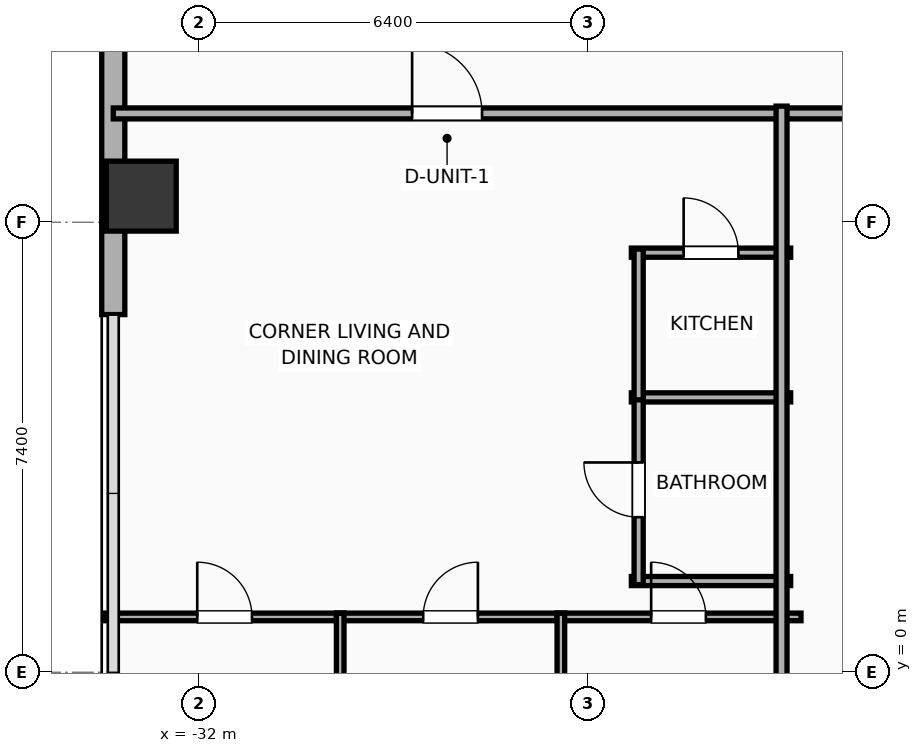
"""IFC4 building model, lengths in metres.
Left out: names, types, materials, properties, quantities, classifications, styles, units other than length and angle.
Written with IfcOpenShell. Run it as: python <this file> out.ifc"""

import sys

from ifc_helpers import new_model, si_unit, direction, frame, frame_2d, origin, origin_2d, place, context, subcontext, project, spatial, rectangle, hollow_rectangle, extrude, element, fill, save


model = new_model("IFC4")
c1 = context("Model", 3, precision=1e-05, world=origin(), true_north=direction((0.0, 1.0)))
c2 = subcontext(c1, "Body", "Model", "MODEL_VIEW")
j1 = project(units=[si_unit("LENGTHUNIT", "METRE"), si_unit("PLANEANGLEUNIT", "RADIAN")], contexts=[c1])
p1 = place(None, origin())
s1 = spatial("IfcSite", under=j1, at=p1, CompositionType="ELEMENT")
p2 = place(p1, origin())
s2 = spatial("IfcBuilding", under=s1, at=p2, CompositionType="ELEMENT")
p3 = place(p2, frame((0.0, 0.0, 61.1)))
s3 = spatial("IfcBuildingStorey", under=s2, at=p3, CompositionType="ELEMENT", Elevation=61.1)
p4 = place(p3, frame((-32.95, 7.83, 0.0), z_axis=(0.0, 0.0, 1.0), x_axis=(1.0, 0.0, 0.0)))
e1 = element("IfcColumn", 1, at=p4, inside=s3, PredefinedType="COLUMN", context=c2, shape_type="SweptSolid", body=[
    extrude(hollow_rectangle(XDim=1.15, YDim=1.15, WallThickness=0.04, at=origin_2d()), origin(), (0.0, 0.0, 1.0), 3.9),
])
p5 = place(p3, frame((-33.41, 5.882, 0.0), z_axis=(0.0, 0.0, 1.0), x_axis=(0.0, 1.0, 0.0)))
e2 = element("IfcWall", 2, at=p5, inside=s3, PredefinedType="ELEMENTEDWALL", context=c2, shape_type="SweptSolid", body=[
    extrude(rectangle(XDim=12.499, YDim=0.38, at=frame_2d((6.25, 0.0))), origin(), (0.0, 0.0, 1.0), 3.65),
])
p6 = place(p5, frame((5.35, 0.0, 0.75)))
e3 = element("IfcOpeningElement", 3, at=p6, cuts=e2, PredefinedType="OPENING", context=c2, shape_type="SweptSolid", body=[
    extrude(rectangle(XDim=1.8, YDim=2.1, at=frame_2d((0.9, 1.05))), frame((0.0, 0.2, 0.0), z_axis=(0.0, -1.0, 0.0), x_axis=(1.0, 0.0, 0.0)), (0.0, 0.0, 1.0), 0.4),
])
p7 = place(p5, frame((9.274, 0.0, 0.75)))
e4 = element("IfcOpeningElement", 4, at=p7, cuts=e2, PredefinedType="OPENING", context=c2, shape_type="SweptSolid", body=[
    extrude(rectangle(XDim=1.2, YDim=2.05, at=frame_2d((0.6, 1.025))), frame((0.0, 0.2, 0.0), z_axis=(0.0, -1.0, 0.0), x_axis=(1.0, 0.0, 0.0)), (0.0, 0.0, 1.0), 0.4),
])
p8 = place(p3, frame((-33.41, 9.19, 0.0), z_axis=(0.0, 0.0, 1.0), x_axis=(1.0, 0.0, 0.0)))
e5 = element("IfcWall", 5, at=p8, inside=s3, PredefinedType="PARTITIONING", context=c2, shape_type="SweptSolid", body=[
    extrude(rectangle(XDim=23.53, YDim=0.18, at=frame_2d((11.765, 0.0))), origin(), (0.0, 0.0, 1.0), 3.65),
])
p9 = place(p8, frame((4.915, 0.0, 0.0)))
e6 = element("IfcOpeningElement", 6, at=p9, cuts=e5, PredefinedType="OPENING", context=c2, shape_type="SweptSolid", body=[
    extrude(rectangle(XDim=1.15, YDim=2.05, at=frame_2d((0.575, 1.025))), frame((0.0, 0.1, 0.0), z_axis=(0.0, -1.0, 0.0), x_axis=(1.0, 0.0, 0.0)), (0.0, 0.0, 1.0), 0.2),
])
p10 = place(p3, frame((-24.89, 6.9, 0.0), z_axis=(0.0, 0.0, 1.0), x_axis=(1.0, 0.0, 0.0)))
e7 = element("IfcWall", 7, at=p10, inside=s3, PredefinedType="PLUMBINGWALL", context=c2, shape_type="SweptSolid", body=[
    extrude(rectangle(XDim=2.62, YDim=0.15, at=frame_2d((1.31, 0.0))), origin(), (0.0, 0.0, 1.0), 3.65),
])
p11 = place(p10, frame((0.86, 0.0, 0.0)))
e8 = element("IfcOpeningElement", 8, at=p11, cuts=e7, PredefinedType="OPENING", context=c2, shape_type="SweptSolid", body=[
    extrude(rectangle(XDim=0.9, YDim=2.05, at=frame_2d((0.45, 1.025))), frame((0.0, 0.085, 0.0), z_axis=(0.0, -1.0, 0.0), x_axis=(1.0, 0.0, 0.0)), (0.0, 0.0, 1.0), 0.17),
])
for number, where, z_axis, x_axis in (
    (9, (-24.89, 4.52, 0.0), (0.0, 0.0, 1.0), (1.0, 0.0, 0.0)),
    (10, (-24.89, 1.5, 0.0), (0.0, 0.0, 1.0), (1.0, 0.0, 0.0)),
):
    element("IfcWall", number, at=place(p3, frame(where, z_axis=z_axis, x_axis=x_axis)), inside=s3, PredefinedType="PLUMBINGWALL", context=c2, shape_type="SweptSolid", body=[
        extrude(rectangle(XDim=2.62, YDim=0.15, at=frame_2d((1.31, 0.0))), origin(), (0.0, 0.0, 1.0), 3.65),
    ])
p12 = place(p3, frame((-24.77, 1.44, 0.0), z_axis=(0.0, 0.0, 1.0), x_axis=(0.0, 1.0, 0.0)))
e11 = element("IfcWall", 11, at=p12, inside=s3, PredefinedType="PLUMBINGWALL", context=c2, shape_type="SweptSolid", body=[
    extrude(rectangle(XDim=3.12, YDim=0.15, at=frame_2d((1.56, 0.0))), origin(), (0.0, 0.0, 1.0), 3.65),
])
p13 = place(p12, frame((1.11, 0.0, 0.0)))
e12 = element("IfcOpeningElement", 12, at=p13, cuts=e11, PredefinedType="OPENING", context=c2, shape_type="SweptSolid", body=[
    extrude(rectangle(XDim=0.9, YDim=2.05, at=frame_2d((0.45, 1.025))), frame((0.0, 0.085, 0.0), z_axis=(0.0, -1.0, 0.0), x_axis=(1.0, 0.0, 0.0)), (0.0, 0.0, 1.0), 0.17),
])
p14 = place(p3, frame((-24.77, 4.48, 0.0), z_axis=(0.0, 0.0, 1.0), x_axis=(0.0, 1.0, 0.0)))
e13 = element("IfcWall", 13, at=p14, inside=s3, PredefinedType="PLUMBINGWALL", context=c2, shape_type="SweptSolid", body=[
    extrude(rectangle(XDim=2.48, YDim=0.15, at=frame_2d((1.24, 0.0))), origin(), (0.0, 0.0, 1.0), 3.65),
])
p15 = place(p3, frame((-33.56, 0.91, 0.0), z_axis=(0.0, 0.0, 1.0), x_axis=(1.0, 0.0, 0.0)))
e14 = element("IfcWall", 14, at=p15, inside=s3, PredefinedType="PARTITIONING", context=c2, shape_type="SweptSolid", body=[
    extrude(rectangle(XDim=3.945, YDim=0.125, at=frame_2d((1.972, 0.0))), origin(), (0.0, 0.0, 1.0), 3.65),
])
p16 = place(p15, frame((1.531, 0.0, 0.0)))
e15 = element("IfcOpeningElement", 15, at=p16, cuts=e14, PredefinedType="OPENING", context=c2, shape_type="SweptSolid", body=[
    extrude(rectangle(XDim=0.9, YDim=2.05, at=frame_2d((0.45, 1.025))), frame((0.0, 0.073, 0.0), z_axis=(0.0, -1.0, 0.0), x_axis=(1.0, 0.0, 0.0)), (0.0, 0.0, 1.0), 0.145),
])
p17 = place(p3, frame((-29.74, 0.91, 0.0), z_axis=(0.0, 0.0, 1.0), x_axis=(1.0, 0.0, 0.0)))
e16 = element("IfcWall", 16, at=p17, inside=s3, PredefinedType="PARTITIONING", context=c2, shape_type="SweptSolid", body=[
    extrude(rectangle(XDim=3.754, YDim=0.125, at=frame_2d((1.877, 0.0))), origin(), (0.0, 0.0, 1.0), 3.65),
])
p18 = place(p17, frame((1.427, 0.0, 0.0)))
e17 = element("IfcOpeningElement", 17, at=p18, cuts=e16, PredefinedType="OPENING", context=c2, shape_type="SweptSolid", body=[
    extrude(rectangle(XDim=0.9, YDim=2.05, at=frame_2d((0.45, 1.025))), frame((0.0, 0.073, 0.0), z_axis=(0.0, -1.0, 0.0), x_axis=(1.0, 0.0, 0.0)), (0.0, 0.0, 1.0), 0.145),
])
p19 = place(p3, frame((-26.112, 0.91, 0.0), z_axis=(0.0, 0.0, 1.0), x_axis=(1.0, 0.0, 0.0)))
e18 = element("IfcWall", 18, at=p19, inside=s3, PredefinedType="PARTITIONING", context=c2, shape_type="SweptSolid", body=[
    extrude(rectangle(XDim=4.011, YDim=0.125, at=frame_2d((2.006, 0.0))), origin(), (0.0, 0.0, 1.0), 3.65),
])
p20 = place(p19, frame((1.547, 0.0, 0.0)))
e19 = element("IfcOpeningElement", 19, at=p20, cuts=e18, PredefinedType="OPENING", context=c2, shape_type="SweptSolid", body=[
    extrude(rectangle(XDim=0.9, YDim=2.05, at=frame_2d((0.45, 1.025))), frame((0.0, 0.073, 0.0), z_axis=(0.0, -1.0, 0.0), x_axis=(1.0, 0.0, 0.0)), (0.0, 0.0, 1.0), 0.145),
])
for number, where, z_axis, x_axis in (
    (20, (-26.049, -9.51, 0.0), (0.0, 0.0, 1.0), (0.0, 1.0, 0.0)),
    (21, (-29.678, -9.51, 0.0), (0.0, 0.0, 1.0), (0.0, 1.0, 0.0)),
):
    element("IfcWall", number, at=place(p3, frame(where, z_axis=z_axis, x_axis=x_axis)), inside=s3, PredefinedType="PARTITIONING", context=c2, shape_type="SweptSolid", body=[
        extrude(rectangle(XDim=10.48, YDim=0.125, at=frame_2d((5.24, 0.0))), origin(), (0.0, 0.0, 1.0), 3.65),
    ])
p21 = place(p3, frame((-22.42, -9.31, 0.0), z_axis=(0.0, 0.0, 1.0), x_axis=(0.0, 1.0, 0.0)))
e22 = element("IfcWall", 22, at=p21, inside=s3, PredefinedType="PARTITIONING", context=c2, shape_type="SweptSolid", body=[
    extrude(rectangle(XDim=18.62, YDim=0.18, at=frame_2d((9.31, 0.0))), origin(), (0.0, 0.0, 1.0), 3.65),
])
p22 = place(p9, origin())
e23 = element("IfcDoor", 23, at=p22, inside=s3, OperationType="SINGLE_SWING_LEFT", PredefinedType="DOOR", context=c2, shape_type="SweptSolid", body=[
    extrude(rectangle(XDim=1.15, YDim=2.05, at=frame_2d((0.575, 1.025))), frame((0.0, 0.025, 0.0), z_axis=(0.0, -1.0, 0.0), x_axis=(1.0, 0.0, 0.0)), (0.0, 0.0, 1.0), 0.05),
])
fill(e6, e23)
p23 = place(p11, origin())
e24 = element("IfcDoor", 24, at=p23, inside=s3, OperationType="SINGLE_SWING_LEFT", PredefinedType="DOOR", context=c2, shape_type="SweptSolid", body=[
    extrude(rectangle(XDim=0.9, YDim=2.05, at=frame_2d((0.45, 1.025))), frame((0.0, 0.025, 0.0), z_axis=(0.0, -1.0, 0.0), x_axis=(1.0, 0.0, 0.0)), (0.0, 0.0, 1.0), 0.05),
])
fill(e8, e24)
p24 = place(p13, origin())
e25 = element("IfcDoor", 25, at=p24, inside=s3, OperationType="SINGLE_SWING_RIGHT", PredefinedType="DOOR", context=c2, shape_type="SweptSolid", body=[
    extrude(rectangle(XDim=0.9, YDim=2.05, at=frame_2d((0.45, 1.025))), frame((0.0, 0.025, 0.0), z_axis=(0.0, -1.0, 0.0), x_axis=(1.0, 0.0, 0.0)), (0.0, 0.0, 1.0), 0.05),
])
fill(e12, e25)
p25 = place(p16, origin())
e26 = element("IfcDoor", 26, at=p25, inside=s3, OperationType="SINGLE_SWING_LEFT", PredefinedType="DOOR", context=c2, shape_type="SweptSolid", body=[
    extrude(rectangle(XDim=0.9, YDim=2.05, at=frame_2d((0.45, 1.025))), frame((0.0, 0.025, 0.0), z_axis=(0.0, -1.0, 0.0), x_axis=(1.0, 0.0, 0.0)), (0.0, 0.0, 1.0), 0.05),
])
fill(e15, e26)
p26 = place(p18, origin())
e27 = element("IfcDoor", 27, at=p26, inside=s3, OperationType="SINGLE_SWING_RIGHT", PredefinedType="DOOR", context=c2, shape_type="SweptSolid", body=[
    extrude(rectangle(XDim=0.9, YDim=2.05, at=frame_2d((0.45, 1.025))), frame((0.0, 0.025, 0.0), z_axis=(0.0, -1.0, 0.0), x_axis=(1.0, 0.0, 0.0)), (0.0, 0.0, 1.0), 0.05),
])
fill(e17, e27)
p27 = place(p20, origin())
e28 = element("IfcDoor", 28, at=p27, inside=s3, OperationType="SINGLE_SWING_LEFT", PredefinedType="DOOR", context=c2, shape_type="SweptSolid", body=[
    extrude(rectangle(XDim=0.9, YDim=2.05, at=frame_2d((0.45, 1.025))), frame((0.0, 0.025, 0.0), z_axis=(0.0, -1.0, 0.0), x_axis=(1.0, 0.0, 0.0)), (0.0, 0.0, 1.0), 0.05),
])
fill(e19, e28)
save(model, sys.argv[1])
